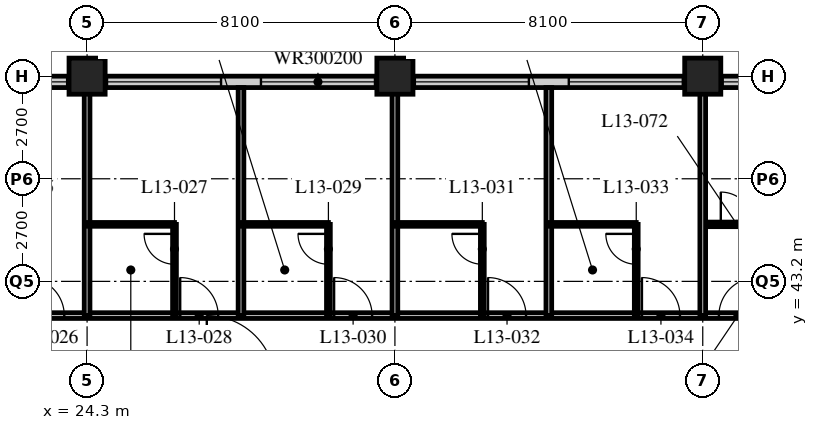
"""IFC4 building model, lengths in metres.
Left out: names, types, materials, properties, quantities, classifications, styles, units other than length and angle.
Written with IfcOpenShell. Run it as: python <this file> out.ifc"""

import sys

from ifc_helpers import new_model, si_unit, direction, frame, frame_2d, origin, origin_2d, place, context, subcontext, project, spatial, rectangle, hollow_rectangle, extrude, element, fill, save


model = new_model("IFC4")
c1 = context("Model", 3, precision=1e-05, world=origin(), true_north=direction((0.0, 1.0)))
c2 = subcontext(c1, "Body", "Model", "MODEL_VIEW")
j1 = project(units=[si_unit("LENGTHUNIT", "METRE"), si_unit("PLANEANGLEUNIT", "RADIAN")], contexts=[c1])
p1 = place(None, origin())
s1 = spatial("IfcSite", under=j1, at=p1, CompositionType="ELEMENT")
p2 = place(p1, origin())
s2 = spatial("IfcBuilding", under=s1, at=p2, CompositionType="ELEMENT")
p3 = place(p2, frame((0.0, 0.0, 56.8)))
s3 = spatial("IfcBuildingStorey", under=s2, at=p3, CompositionType="ELEMENT", Elevation=56.8)
for number, where, z_axis, x_axis in (
    (1, (24.3, 48.6, 0.0), (0.0, 0.0, 1.0), (1.0, 0.0, 0.0)),
    (2, (32.4, 48.6, 0.0), (0.0, 0.0, 1.0), (1.0, 0.0, 0.0)),
    (3, (40.5, 48.6, 0.0), (0.0, 0.0, 1.0), (1.0, 0.0, 0.0)),
):
    element("IfcColumn", number, at=place(p3, frame(where, z_axis=z_axis, x_axis=x_axis)), inside=s3, PredefinedType="COLUMN", context=c2, shape_type="SweptSolid", body=[
        extrude(hollow_rectangle(XDim=0.95, YDim=0.95, WallThickness=0.095, at=origin_2d()), origin(), (0.0, 0.0, 1.0), 3.4),
    ])
p4 = place(p3, frame((48.3, 48.45, 0.0), z_axis=(0.0, 0.0, 1.0), x_axis=(-1.0, 0.0, 0.0)))
e4 = element("IfcWall", 4, at=p4, inside=s3, PredefinedType="SOLIDWALL", context=c2, shape_type="SweptSolid", body=[
    extrude(rectangle(XDim=40.2, YDim=0.3, at=frame_2d((20.1, 0.0))), origin(), (0.0, 0.0, 1.0), 3.19),
])
p5 = place(p4, frame((0.225, 0.0, 0.9)))
e5 = element("IfcOpeningElement", 5, at=p5, cuts=e4, PredefinedType="OPENING", context=c2, shape_type="SweptSolid", body=[
    extrude(rectangle(XDim=3.0, YDim=2.0, at=frame_2d((1.5, 1.0))), frame((0.0, 0.16, 0.0), z_axis=(0.0, -1.0, 0.0), x_axis=(1.0, 0.0, 0.0)), (0.0, 0.0, 1.0), 0.32),
])
p6 = place(p4, frame((4.275, 0.0, 0.9)))
e6 = element("IfcOpeningElement", 6, at=p6, cuts=e4, PredefinedType="OPENING", context=c2, shape_type="SweptSolid", body=[
    extrude(rectangle(XDim=3.0, YDim=2.0, at=frame_2d((1.5, 1.0))), frame((0.0, 0.16, 0.0), z_axis=(0.0, -1.0, 0.0), x_axis=(1.0, 0.0, 0.0)), (0.0, 0.0, 1.0), 0.32),
])
p7 = place(p4, frame((8.325, 0.0, 0.9)))
e7 = element("IfcOpeningElement", 7, at=p7, cuts=e4, PredefinedType="OPENING", context=c2, shape_type="SweptSolid", body=[
    extrude(rectangle(XDim=3.0, YDim=2.0, at=frame_2d((1.5, 1.0))), frame((0.0, 0.16, 0.0), z_axis=(0.0, -1.0, 0.0), x_axis=(1.0, 0.0, 0.0)), (0.0, 0.0, 1.0), 0.32),
])
p8 = place(p4, frame((12.375, 0.0, 0.9)))
e8 = element("IfcOpeningElement", 8, at=p8, cuts=e4, PredefinedType="OPENING", context=c2, shape_type="SweptSolid", body=[
    extrude(rectangle(XDim=3.0, YDim=2.0, at=frame_2d((1.5, 1.0))), frame((0.0, 0.16, 0.0), z_axis=(0.0, -1.0, 0.0), x_axis=(1.0, 0.0, 0.0)), (0.0, 0.0, 1.0), 0.32),
])
p9 = place(p4, frame((16.425, 0.0, 0.9)))
e9 = element("IfcOpeningElement", 9, at=p9, cuts=e4, PredefinedType="OPENING", context=c2, shape_type="SweptSolid", body=[
    extrude(rectangle(XDim=3.0, YDim=2.0, at=frame_2d((1.5, 1.0))), frame((0.0, 0.16, 0.0), z_axis=(0.0, -1.0, 0.0), x_axis=(1.0, 0.0, 0.0)), (0.0, 0.0, 1.0), 0.32),
])
p10 = place(p4, frame((20.475, 0.0, 0.9)))
e10 = element("IfcOpeningElement", 10, at=p10, cuts=e4, PredefinedType="OPENING", context=c2, shape_type="SweptSolid", body=[
    extrude(rectangle(XDim=3.0, YDim=2.0, at=frame_2d((1.5, 1.0))), frame((0.0, 0.16, 0.0), z_axis=(0.0, -1.0, 0.0), x_axis=(1.0, 0.0, 0.0)), (0.0, 0.0, 1.0), 0.32),
])
p11 = place(p4, frame((24.525, 0.0, 0.9)))
e11 = element("IfcOpeningElement", 11, at=p11, cuts=e4, PredefinedType="OPENING", context=c2, shape_type="SweptSolid", body=[
    extrude(rectangle(XDim=3.0, YDim=2.0, at=frame_2d((1.5, 1.0))), frame((0.0, 0.16, 0.0), z_axis=(0.0, -1.0, 0.0), x_axis=(1.0, 0.0, 0.0)), (0.0, 0.0, 1.0), 0.32),
])
p12 = place(p4, frame((28.575, 0.0, 0.9)))
e12 = element("IfcOpeningElement", 12, at=p12, cuts=e4, PredefinedType="OPENING", context=c2, shape_type="SweptSolid", body=[
    extrude(rectangle(XDim=3.0, YDim=2.0, at=frame_2d((1.5, 1.0))), frame((0.0, 0.16, 0.0), z_axis=(0.0, -1.0, 0.0), x_axis=(1.0, 0.0, 0.0)), (0.0, 0.0, 1.0), 0.32),
])
p13 = place(p4, frame((32.625, 0.0, 0.9)))
e13 = element("IfcOpeningElement", 13, at=p13, cuts=e4, PredefinedType="OPENING", context=c2, shape_type="SweptSolid", body=[
    extrude(rectangle(XDim=3.0, YDim=2.0, at=frame_2d((1.5, 1.0))), frame((0.0, 0.16, 0.0), z_axis=(0.0, -1.0, 0.0), x_axis=(1.0, 0.0, 0.0)), (0.0, 0.0, 1.0), 0.32),
])
p14 = place(p4, frame((36.675, 0.0, 0.9)))
e14 = element("IfcOpeningElement", 14, at=p14, cuts=e4, PredefinedType="OPENING", context=c2, shape_type="SweptSolid", body=[
    extrude(rectangle(XDim=3.0, YDim=2.0, at=frame_2d((1.5, 1.0))), frame((0.0, 0.16, 0.0), z_axis=(0.0, -1.0, 0.0), x_axis=(1.0, 0.0, 0.0)), (0.0, 0.0, 1.0), 0.32),
])
p15 = place(p3, frame((12.15, 42.3, 0.0), z_axis=(0.0, 0.0, 1.0), x_axis=(1.0, 0.0, 0.0)))
e15 = element("IfcWall", 15, at=p15, inside=s3, PredefinedType="PARTITIONING", context=c2, shape_type="SweptSolid", body=[
    extrude(rectangle(XDim=32.4, YDim=0.15, at=frame_2d((16.2, 0.0))), origin(), (0.0, 0.0, 1.0), 3.19),
])
p16 = place(p15, frame((6.5, 0.0, 0.0)))
e16 = element("IfcOpeningElement", 16, at=p16, cuts=e15, PredefinedType="OPENING", context=c2, shape_type="SweptSolid", body=[
    extrude(rectangle(XDim=1.0, YDim=2.1, at=frame_2d((0.5, 1.05))), frame((0.0, 0.085, 0.0), z_axis=(0.0, -1.0, 0.0), x_axis=(1.0, 0.0, 0.0)), (0.0, 0.0, 1.0), 0.17),
])
p17 = place(p15, frame((10.55, 0.0, 0.0)))
e17 = element("IfcOpeningElement", 17, at=p17, cuts=e15, PredefinedType="OPENING", context=c2, shape_type="SweptSolid", body=[
    extrude(rectangle(XDim=1.0, YDim=2.1, at=frame_2d((0.5, 1.05))), frame((0.0, 0.085, 0.0), z_axis=(0.0, -1.0, 0.0), x_axis=(1.0, 0.0, 0.0)), (0.0, 0.0, 1.0), 0.17),
])
p18 = place(p15, frame((14.6, 0.0, 0.0)))
e18 = element("IfcOpeningElement", 18, at=p18, cuts=e15, PredefinedType="OPENING", context=c2, shape_type="SweptSolid", body=[
    extrude(rectangle(XDim=1.0, YDim=2.1, at=frame_2d((0.5, 1.05))), frame((0.0, 0.085, 0.0), z_axis=(0.0, -1.0, 0.0), x_axis=(1.0, 0.0, 0.0)), (0.0, 0.0, 1.0), 0.17),
])
p19 = place(p15, frame((18.65, 0.0, 0.0)))
e19 = element("IfcOpeningElement", 19, at=p19, cuts=e15, PredefinedType="OPENING", context=c2, shape_type="SweptSolid", body=[
    extrude(rectangle(XDim=1.0, YDim=2.1, at=frame_2d((0.5, 1.05))), frame((0.0, 0.085, 0.0), z_axis=(0.0, -1.0, 0.0), x_axis=(1.0, 0.0, 0.0)), (0.0, 0.0, 1.0), 0.17),
])
p20 = place(p15, frame((22.7, 0.0, 0.0)))
e20 = element("IfcOpeningElement", 20, at=p20, cuts=e15, PredefinedType="OPENING", context=c2, shape_type="SweptSolid", body=[
    extrude(rectangle(XDim=1.0, YDim=2.1, at=frame_2d((0.5, 1.05))), frame((0.0, 0.085, 0.0), z_axis=(0.0, -1.0, 0.0), x_axis=(1.0, 0.0, 0.0)), (0.0, 0.0, 1.0), 0.17),
])
p21 = place(p15, frame((26.75, 0.0, 0.0)))
e21 = element("IfcOpeningElement", 21, at=p21, cuts=e15, PredefinedType="OPENING", context=c2, shape_type="SweptSolid", body=[
    extrude(rectangle(XDim=1.0, YDim=2.1, at=frame_2d((0.5, 1.05))), frame((0.0, 0.085, 0.0), z_axis=(0.0, -1.0, 0.0), x_axis=(1.0, 0.0, 0.0)), (0.0, 0.0, 1.0), 0.17),
])
p22 = place(p15, frame((28.775, 0.0, 0.0)))
e22 = element("IfcOpeningElement", 22, at=p22, cuts=e15, PredefinedType="OPENING", context=c2, shape_type="SweptSolid", body=[
    extrude(rectangle(XDim=1.0, YDim=2.1, at=frame_2d((0.5, 1.05))), frame((0.0, 0.085, 0.0), z_axis=(0.0, -1.0, 0.0), x_axis=(1.0, 0.0, 0.0)), (0.0, 0.0, 1.0), 0.17),
])
p23 = place(p15, frame((2.625, 0.0, 0.0)))
e23 = element("IfcOpeningElement", 23, at=p23, cuts=e15, PredefinedType="OPENING", context=c2, shape_type="SweptSolid", body=[
    extrude(rectangle(XDim=1.0, YDim=2.1, at=frame_2d((0.5, 1.05))), frame((0.0, 0.085, 0.0), z_axis=(0.0, -1.0, 0.0), x_axis=(1.0, 0.0, 0.0)), (0.0, 0.0, 1.0), 0.17),
])
p24 = place(p3, frame((24.3, 42.3, 0.0), z_axis=(0.0, 0.0, 1.0), x_axis=(0.0, 1.0, 0.0)))
e24 = element("IfcWall", 24, at=p24, inside=s3, PredefinedType="PARTITIONING", context=c2, shape_type="SweptSolid", body=[
    extrude(rectangle(XDim=6.0, YDim=0.15, at=frame_2d((3.0, 0.0))), origin(), (0.0, 0.0, 1.0), 2.578),
])
p25 = place(p3, frame((24.3, 44.7, 0.0), z_axis=(0.0, 0.0, 1.0), x_axis=(1.0, 0.0, 0.0)))
e25 = element("IfcWall", 25, at=p25, inside=s3, PredefinedType="PARTITIONING", context=c2, shape_type="SweptSolid", body=[
    extrude(rectangle(XDim=2.3, YDim=0.1, at=frame_2d((1.15, 0.0))), origin(), (0.0, 0.0, 1.0), 3.19),
])
p26 = place(p3, frame((26.6, 42.3, 0.0), z_axis=(0.0, 0.0, 1.0), x_axis=(0.0, 1.0, 0.0)))
e26 = element("IfcWall", 26, at=p26, inside=s3, PredefinedType="PARTITIONING", context=c2, shape_type="SweptSolid", body=[
    extrude(rectangle(XDim=2.4, YDim=0.1, at=frame_2d((1.2, 0.0))), origin(), (0.0, 0.0, 1.0), 3.19),
])
p27 = place(p26, frame((1.35, 0.0, 0.0)))
e27 = element("IfcOpeningElement", 27, at=p27, cuts=e26, PredefinedType="OPENING", context=c2, shape_type="SweptSolid", body=[
    extrude(rectangle(XDim=0.8, YDim=2.1, at=frame_2d((0.4, 1.05))), frame((0.0, 0.06, 0.0), z_axis=(0.0, -1.0, 0.0), x_axis=(1.0, 0.0, 0.0)), (0.0, 0.0, 1.0), 0.12),
])
p28 = place(p3, frame((28.35, 42.3, 0.0), z_axis=(0.0, 0.0, 1.0), x_axis=(0.0, 1.0, 0.0)))
e28 = element("IfcWall", 28, at=p28, inside=s3, PredefinedType="PARTITIONING", context=c2, shape_type="SweptSolid", body=[
    extrude(rectangle(XDim=6.0, YDim=0.15, at=frame_2d((3.0, 0.0))), origin(), (0.0, 0.0, 1.0), 3.19),
])
p29 = place(p3, frame((28.35, 44.7, 0.0), z_axis=(0.0, 0.0, 1.0), x_axis=(1.0, 0.0, 0.0)))
e29 = element("IfcWall", 29, at=p29, inside=s3, PredefinedType="PARTITIONING", context=c2, shape_type="SweptSolid", body=[
    extrude(rectangle(XDim=2.3, YDim=0.1, at=frame_2d((1.15, 0.0))), origin(), (0.0, 0.0, 1.0), 3.19),
])
p30 = place(p3, frame((30.65, 42.3, 0.0), z_axis=(0.0, 0.0, 1.0), x_axis=(0.0, 1.0, 0.0)))
e30 = element("IfcWall", 30, at=p30, inside=s3, PredefinedType="PARTITIONING", context=c2, shape_type="SweptSolid", body=[
    extrude(rectangle(XDim=2.4, YDim=0.1, at=frame_2d((1.2, 0.0))), origin(), (0.0, 0.0, 1.0), 3.19),
])
p31 = place(p30, frame((1.35, 0.0, 0.0)))
e31 = element("IfcOpeningElement", 31, at=p31, cuts=e30, PredefinedType="OPENING", context=c2, shape_type="SweptSolid", body=[
    extrude(rectangle(XDim=0.8, YDim=2.1, at=frame_2d((0.4, 1.05))), frame((0.0, 0.06, 0.0), z_axis=(0.0, -1.0, 0.0), x_axis=(1.0, 0.0, 0.0)), (0.0, 0.0, 1.0), 0.12),
])
p32 = place(p3, frame((32.4, 42.3, 0.0), z_axis=(0.0, 0.0, 1.0), x_axis=(0.0, 1.0, 0.0)))
e32 = element("IfcWall", 32, at=p32, inside=s3, PredefinedType="PARTITIONING", context=c2, shape_type="SweptSolid", body=[
    extrude(rectangle(XDim=6.0, YDim=0.15, at=frame_2d((3.0, 0.0))), origin(), (0.0, 0.0, 1.0), 2.578),
])
p33 = place(p3, frame((32.4, 44.7, 0.0), z_axis=(0.0, 0.0, 1.0), x_axis=(1.0, 0.0, 0.0)))
e33 = element("IfcWall", 33, at=p33, inside=s3, PredefinedType="PARTITIONING", context=c2, shape_type="SweptSolid", body=[
    extrude(rectangle(XDim=2.3, YDim=0.1, at=frame_2d((1.15, 0.0))), origin(), (0.0, 0.0, 1.0), 3.19),
])
p34 = place(p3, frame((34.7, 42.3, 0.0), z_axis=(0.0, 0.0, 1.0), x_axis=(0.0, 1.0, 0.0)))
e34 = element("IfcWall", 34, at=p34, inside=s3, PredefinedType="PARTITIONING", context=c2, shape_type="SweptSolid", body=[
    extrude(rectangle(XDim=2.4, YDim=0.1, at=frame_2d((1.2, 0.0))), origin(), (0.0, 0.0, 1.0), 3.19),
])
p35 = place(p34, frame((1.35, 0.0, 0.0)))
e35 = element("IfcOpeningElement", 35, at=p35, cuts=e34, PredefinedType="OPENING", context=c2, shape_type="SweptSolid", body=[
    extrude(rectangle(XDim=0.8, YDim=2.1, at=frame_2d((0.4, 1.05))), frame((0.0, 0.06, 0.0), z_axis=(0.0, -1.0, 0.0), x_axis=(1.0, 0.0, 0.0)), (0.0, 0.0, 1.0), 0.12),
])
p36 = place(p3, frame((36.45, 42.3, 0.0), z_axis=(0.0, 0.0, 1.0), x_axis=(0.0, 1.0, 0.0)))
e36 = element("IfcWall", 36, at=p36, inside=s3, PredefinedType="PARTITIONING", context=c2, shape_type="SweptSolid", body=[
    extrude(rectangle(XDim=6.0, YDim=0.15, at=frame_2d((3.0, 0.0))), origin(), (0.0, 0.0, 1.0), 3.19),
])
p37 = place(p3, frame((36.45, 44.7, 0.0), z_axis=(0.0, 0.0, 1.0), x_axis=(1.0, 0.0, 0.0)))
e37 = element("IfcWall", 37, at=p37, inside=s3, PredefinedType="PARTITIONING", context=c2, shape_type="SweptSolid", body=[
    extrude(rectangle(XDim=2.3, YDim=0.1, at=frame_2d((1.15, 0.0))), origin(), (0.0, 0.0, 1.0), 3.19),
])
p38 = place(p3, frame((38.75, 42.3, 0.0), z_axis=(0.0, 0.0, 1.0), x_axis=(0.0, 1.0, 0.0)))
e38 = element("IfcWall", 38, at=p38, inside=s3, PredefinedType="PARTITIONING", context=c2, shape_type="SweptSolid", body=[
    extrude(rectangle(XDim=2.4, YDim=0.1, at=frame_2d((1.2, 0.0))), origin(), (0.0, 0.0, 1.0), 3.19),
])
p39 = place(p38, frame((1.35, 0.0, 0.0)))
e39 = element("IfcOpeningElement", 39, at=p39, cuts=e38, PredefinedType="OPENING", context=c2, shape_type="SweptSolid", body=[
    extrude(rectangle(XDim=0.8, YDim=2.1, at=frame_2d((0.4, 1.05))), frame((0.0, 0.06, 0.0), z_axis=(0.0, -1.0, 0.0), x_axis=(1.0, 0.0, 0.0)), (0.0, 0.0, 1.0), 0.12),
])
p40 = place(p3, frame((40.5, 44.7, 0.0), z_axis=(0.0, 0.0, 1.0), x_axis=(1.0, 0.0, 0.0)))
e40 = element("IfcWall", 40, at=p40, inside=s3, PredefinedType="PARTITIONING", context=c2, shape_type="SweptSolid", body=[
    extrude(rectangle(XDim=4.05, YDim=0.12, at=frame_2d((2.025, 0.0))), origin(), (0.0, 0.0, 1.0), 3.19),
])
p41 = place(p40, frame((0.475, 0.0, 0.0)))
e41 = element("IfcOpeningElement", 41, at=p41, cuts=e40, PredefinedType="OPENING", context=c2, shape_type="SweptSolid", body=[
    extrude(rectangle(XDim=0.85, YDim=2.1, at=frame_2d((0.425, 1.05))), frame((0.0, 0.07, 0.0), z_axis=(0.0, -1.0, 0.0), x_axis=(1.0, 0.0, 0.0)), (0.0, 0.0, 1.0), 0.14),
])
p42 = place(p3, frame((40.5, 42.3, 0.0), z_axis=(0.0, 0.0, 1.0), x_axis=(0.0, 1.0, 0.0)))
e42 = element("IfcWall", 42, at=p42, inside=s3, PredefinedType="PARTITIONING", context=c2, shape_type="SweptSolid", body=[
    extrude(rectangle(XDim=6.0, YDim=0.15, at=frame_2d((3.0, 0.0))), origin(), (0.0, 0.0, 1.0), 2.578),
])
p43 = place(p6, origin())
e43 = element("IfcWindow", 43, at=p43, inside=s3, PartitioningType="SINGLE_PANEL", PredefinedType="WINDOW", context=c2, shape_type="SweptSolid", body=[
    extrude(rectangle(XDim=3.0, YDim=2.0, at=frame_2d((1.5, 1.0))), frame((0.0, 0.03, 0.0), z_axis=(0.0, -1.0, 0.0), x_axis=(1.0, 0.0, 0.0)), (0.0, 0.0, 1.0), 0.06),
])
fill(e6, e43)
p44 = place(p7, origin())
e44 = element("IfcWindow", 44, at=p44, inside=s3, PartitioningType="SINGLE_PANEL", PredefinedType="WINDOW", context=c2, shape_type="SweptSolid", body=[
    extrude(rectangle(XDim=3.0, YDim=2.0, at=frame_2d((1.5, 1.0))), frame((0.0, 0.03, 0.0), z_axis=(0.0, -1.0, 0.0), x_axis=(1.0, 0.0, 0.0)), (0.0, 0.0, 1.0), 0.06),
])
fill(e7, e44)
p45 = place(p8, origin())
e45 = element("IfcWindow", 45, at=p45, inside=s3, PartitioningType="SINGLE_PANEL", PredefinedType="WINDOW", context=c2, shape_type="SweptSolid", body=[
    extrude(rectangle(XDim=3.0, YDim=2.0, at=frame_2d((1.5, 1.0))), frame((0.0, 0.03, 0.0), z_axis=(0.0, -1.0, 0.0), x_axis=(1.0, 0.0, 0.0)), (0.0, 0.0, 1.0), 0.06),
])
fill(e8, e45)
p46 = place(p9, origin())
e46 = element("IfcWindow", 46, at=p46, inside=s3, PartitioningType="SINGLE_PANEL", PredefinedType="WINDOW", context=c2, shape_type="SweptSolid", body=[
    extrude(rectangle(XDim=3.0, YDim=2.0, at=frame_2d((1.5, 1.0))), frame((0.0, 0.03, 0.0), z_axis=(0.0, -1.0, 0.0), x_axis=(1.0, 0.0, 0.0)), (0.0, 0.0, 1.0), 0.06),
])
fill(e9, e46)
p47 = place(p10, origin())
e47 = element("IfcWindow", 47, at=p47, inside=s3, PartitioningType="SINGLE_PANEL", PredefinedType="WINDOW", context=c2, shape_type="SweptSolid", body=[
    extrude(rectangle(XDim=3.0, YDim=2.0, at=frame_2d((1.5, 1.0))), frame((0.0, 0.03, 0.0), z_axis=(0.0, -1.0, 0.0), x_axis=(1.0, 0.0, 0.0)), (0.0, 0.0, 1.0), 0.06),
])
fill(e10, e47)
p48 = place(p11, origin())
e48 = element("IfcWindow", 48, at=p48, inside=s3, PartitioningType="SINGLE_PANEL", PredefinedType="WINDOW", context=c2, shape_type="SweptSolid", body=[
    extrude(rectangle(XDim=3.0, YDim=2.0, at=frame_2d((1.5, 1.0))), frame((0.0, 0.03, 0.0), z_axis=(0.0, -1.0, 0.0), x_axis=(1.0, 0.0, 0.0)), (0.0, 0.0, 1.0), 0.06),
])
fill(e11, e48)
p49 = place(p17, origin())
e49 = element("IfcDoor", 49, at=p49, inside=s3, OperationType="SINGLE_SWING_LEFT", PredefinedType="DOOR", context=c2, shape_type="SweptSolid", body=[
    extrude(rectangle(XDim=1.0, YDim=2.1, at=frame_2d((0.5, 1.05))), frame((0.0, 0.025, 0.0), z_axis=(0.0, -1.0, 0.0), x_axis=(1.0, 0.0, 0.0)), (0.0, 0.0, 1.0), 0.05),
])
fill(e17, e49)
p50 = place(p27, origin())
e50 = element("IfcDoor", 50, at=p50, inside=s3, OperationType="SINGLE_SWING_RIGHT", PredefinedType="DOOR", context=c2, shape_type="SweptSolid", body=[
    extrude(rectangle(XDim=0.8, YDim=2.1, at=frame_2d((0.4, 1.05))), frame((0.0, 0.025, 0.0), z_axis=(0.0, -1.0, 0.0), x_axis=(1.0, 0.0, 0.0)), (0.0, 0.0, 1.0), 0.05),
])
fill(e27, e50)
p51 = place(p18, origin())
e51 = element("IfcDoor", 51, at=p51, inside=s3, OperationType="SINGLE_SWING_LEFT", PredefinedType="DOOR", context=c2, shape_type="SweptSolid", body=[
    extrude(rectangle(XDim=1.0, YDim=2.1, at=frame_2d((0.5, 1.05))), frame((0.0, 0.025, 0.0), z_axis=(0.0, -1.0, 0.0), x_axis=(1.0, 0.0, 0.0)), (0.0, 0.0, 1.0), 0.05),
])
fill(e18, e51)
p52 = place(p31, origin())
e52 = element("IfcDoor", 52, at=p52, inside=s3, OperationType="SINGLE_SWING_RIGHT", PredefinedType="DOOR", context=c2, shape_type="SweptSolid", body=[
    extrude(rectangle(XDim=0.8, YDim=2.1, at=frame_2d((0.4, 1.05))), frame((0.0, 0.025, 0.0), z_axis=(0.0, -1.0, 0.0), x_axis=(1.0, 0.0, 0.0)), (0.0, 0.0, 1.0), 0.05),
])
fill(e31, e52)
p53 = place(p19, origin())
e53 = element("IfcDoor", 53, at=p53, inside=s3, OperationType="SINGLE_SWING_LEFT", PredefinedType="DOOR", context=c2, shape_type="SweptSolid", body=[
    extrude(rectangle(XDim=1.0, YDim=2.1, at=frame_2d((0.5, 1.05))), frame((0.0, 0.025, 0.0), z_axis=(0.0, -1.0, 0.0), x_axis=(1.0, 0.0, 0.0)), (0.0, 0.0, 1.0), 0.05),
])
fill(e19, e53)
p54 = place(p35, origin())
e54 = element("IfcDoor", 54, at=p54, inside=s3, OperationType="SINGLE_SWING_RIGHT", PredefinedType="DOOR", context=c2, shape_type="SweptSolid", body=[
    extrude(rectangle(XDim=0.8, YDim=2.1, at=frame_2d((0.4, 1.05))), frame((0.0, 0.025, 0.0), z_axis=(0.0, -1.0, 0.0), x_axis=(1.0, 0.0, 0.0)), (0.0, 0.0, 1.0), 0.05),
])
fill(e35, e54)
p55 = place(p20, origin())
e55 = element("IfcDoor", 55, at=p55, inside=s3, OperationType="SINGLE_SWING_LEFT", PredefinedType="DOOR", context=c2, shape_type="SweptSolid", body=[
    extrude(rectangle(XDim=1.0, YDim=2.1, at=frame_2d((0.5, 1.05))), frame((0.0, 0.025, 0.0), z_axis=(0.0, -1.0, 0.0), x_axis=(1.0, 0.0, 0.0)), (0.0, 0.0, 1.0), 0.05),
])
fill(e20, e55)
p56 = place(p39, origin())
e56 = element("IfcDoor", 56, at=p56, inside=s3, OperationType="SINGLE_SWING_RIGHT", PredefinedType="DOOR", context=c2, shape_type="SweptSolid", body=[
    extrude(rectangle(XDim=0.8, YDim=2.1, at=frame_2d((0.4, 1.05))), frame((0.0, 0.025, 0.0), z_axis=(0.0, -1.0, 0.0), x_axis=(1.0, 0.0, 0.0)), (0.0, 0.0, 1.0), 0.05),
])
fill(e39, e56)
p57 = place(p21, origin())
e57 = element("IfcDoor", 57, at=p57, inside=s3, OperationType="SINGLE_SWING_LEFT", PredefinedType="DOOR", context=c2, shape_type="SweptSolid", body=[
    extrude(rectangle(XDim=1.0, YDim=2.1, at=frame_2d((0.5, 1.05))), frame((0.0, 0.025, 0.0), z_axis=(0.0, -1.0, 0.0), x_axis=(1.0, 0.0, 0.0)), (0.0, 0.0, 1.0), 0.05),
])
fill(e21, e57)
p58 = place(p22, origin())
e58 = element("IfcDoor", 58, at=p58, inside=s3, OperationType="SINGLE_SWING_RIGHT", PredefinedType="DOOR", context=c2, shape_type="SweptSolid", body=[
    extrude(rectangle(XDim=1.0, YDim=2.1, at=frame_2d((0.5, 1.05))), frame((0.0, 0.025, 0.0), z_axis=(0.0, -1.0, 0.0), x_axis=(1.0, 0.0, 0.0)), (0.0, 0.0, 1.0), 0.05),
])
fill(e22, e58)
p59 = place(p41, origin())
e59 = element("IfcDoor", 59, at=p59, inside=s3, OperationType="SINGLE_SWING_LEFT", PredefinedType="DOOR", context=c2, shape_type="SweptSolid", body=[
    extrude(rectangle(XDim=0.85, YDim=2.1, at=frame_2d((0.425, 1.05))), frame((0.0, 0.025, 0.0), z_axis=(0.0, -1.0, 0.0), x_axis=(1.0, 0.0, 0.0)), (0.0, 0.0, 1.0), 0.05),
])
fill(e41, e59)
save(model, sys.argv[1])
